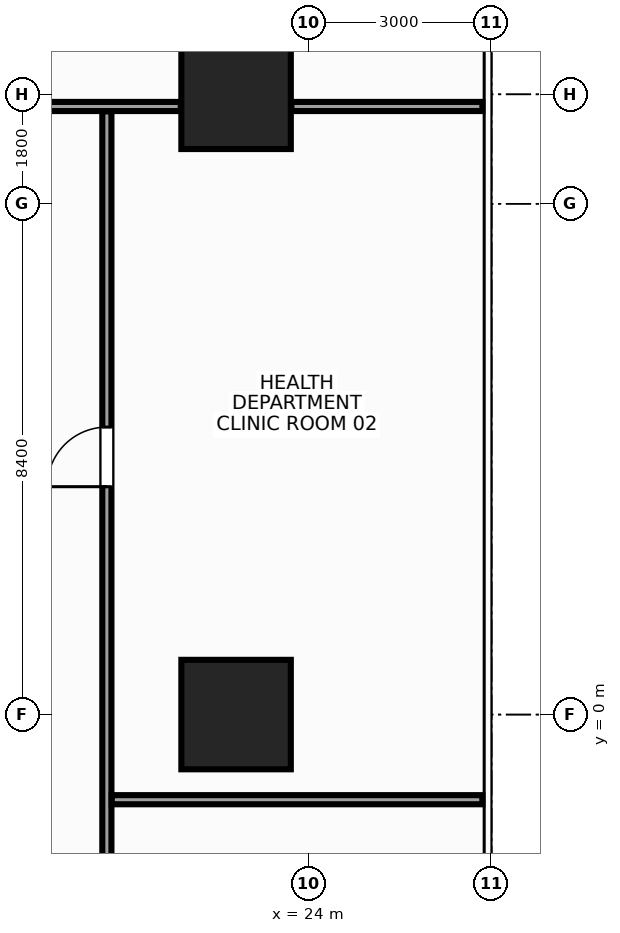
"""IFC4 building model, lengths in metres.
Left out: names, types, materials, properties, quantities, classifications, styles, units other than length and angle.
Written with IfcOpenShell. Run it as: python <this file> out.ifc"""

import sys

from ifc_helpers import new_model, si_unit, direction, frame, frame_2d, origin, origin_2d, place, context, subcontext, project, spatial, rectangle, extrude, source, transform, mapped, element, fill, save


model = new_model("IFC4")
c1 = context("Model", 3, precision=1e-05, world=origin(), true_north=direction((0.0, 1.0)))
c2 = subcontext(c1, "Body", "Model", "MODEL_VIEW")
j1 = project(units=[si_unit("LENGTHUNIT", "METRE"), si_unit("PLANEANGLEUNIT", "RADIAN")], contexts=[c1])
p1 = place(None, origin())
s1 = spatial("IfcSite", under=j1, at=p1, CompositionType="ELEMENT")
p2 = place(p1, origin())
s2 = spatial("IfcBuilding", under=s1, at=p2, CompositionType="ELEMENT")
p3 = place(p2, frame((0.0, 0.0, 48.8)))
s3 = spatial("IfcBuildingStorey", under=s2, at=p3, CompositionType="ELEMENT", Elevation=48.8)
m1 = source(origin(), c2, "Body", "SweptSolid", [
    extrude(rectangle(XDim=1.8, YDim=1.8, at=origin_2d()), origin(), (0.0, 0.0, 1.0), 3.6),
])
for number, where, z_axis, x_axis in (
    (1, (22.8, 0.0, 0.0), (0.0, 0.0, 1.0), (1.0, 0.0, 0.0)),
    (2, (22.8, 10.2, 0.0), (0.0, 0.0, 1.0), (1.0, 0.0, 0.0)),
):
    element("IfcColumn", number, at=place(p3, frame(where, z_axis=z_axis, x_axis=x_axis)), inside=s3, PredefinedType="COLUMN", context=c2, shape_type="MappedRepresentation", body=[
        mapped(m1, transform((0.0, 0.0, 0.0), x_axis=(1.0, 0.0, 0.0), y_axis=(0.0, 1.0, 0.0), z_axis=(0.0, 0.0, 1.0), scale=1.0)),
    ])
m2 = source(origin(), c2, "Body", "SweptSolid", [
    extrude(rectangle(XDim=4.18, YDim=0.15, at=frame_2d((2.09, 0.0))), origin(), (0.0, 0.0, 1.0), 2.745),
])
p4 = place(p3, frame((17.71, 10.0, 0.0), z_axis=(0.0, 0.0, 1.0), x_axis=(1.0, 0.0, 0.0)))
e3 = element("IfcWall", 3, at=p4, inside=s3, PredefinedType="PARTITIONING", context=c2, shape_type="MappedRepresentation", body=[
    mapped(m2, transform((0.0, 0.0, 0.0), x_axis=(1.0, 0.0, 0.0), y_axis=(0.0, 1.0, 0.0), z_axis=(0.0, 0.0, 1.0), scale=1.0)),
])
m3 = source(origin(), c2, "Body", "SweptSolid", [
    extrude(rectangle(XDim=3.14, YDim=0.15, at=frame_2d((1.57, 0.0))), origin(), (0.0, 0.0, 1.0), 2.435),
])
p5 = place(p3, frame((23.71, 10.0, 0.0), z_axis=(0.0, 0.0, 1.0), x_axis=(1.0, 0.0, 0.0)))
e4 = element("IfcWall", 4, at=p5, inside=s3, PredefinedType="PARTITIONING", context=c2, shape_type="MappedRepresentation", body=[
    mapped(m3, transform((0.0, 0.0, 0.0), x_axis=(1.0, 0.0, 0.0), y_axis=(0.0, 1.0, 0.0), z_axis=(0.0, 0.0, 1.0), scale=1.0)),
])
m4 = source(origin(), c2, "Body", "SweptSolid", [
    extrude(rectangle(XDim=24.115, YDim=0.15, at=frame_2d((12.058, 0.0))), origin(), (0.0, 0.0, 1.0), 2.745),
])
p6 = place(p3, frame((20.675, -14.195, 0.0), z_axis=(0.0, 0.0, 1.0), x_axis=(0.0, 1.0, 0.0)))
e5 = element("IfcWall", 5, at=p6, inside=s3, PredefinedType="PARTITIONING", context=c2, shape_type="MappedRepresentation", body=[
    mapped(m4, transform((0.0, 0.0, 0.0), x_axis=(1.0, 0.0, 0.0), y_axis=(0.0, 1.0, 0.0), z_axis=(0.0, 0.0, 1.0), scale=1.0)),
])
p7 = place(p6, frame((17.942, 0.0, 0.0)))
e6 = element("IfcOpeningElement", 6, at=p7, cuts=e5, PredefinedType="OPENING", context=c2, shape_type="SweptSolid", body=[
    extrude(rectangle(XDim=0.98, YDim=2.15, at=frame_2d((0.49, 1.075))), frame((0.0, 0.087, 0.0), z_axis=(0.0, -1.0, 0.0), x_axis=(1.0, 0.0, 0.0)), (0.0, 0.0, 1.0), 0.174),
])
m5 = source(origin(), c2, "Body", "SweptSolid", [
    extrude(rectangle(XDim=6.095, YDim=0.15, at=frame_2d((3.048, 0.0))), origin(), (0.0, 0.0, 1.0), 2.745),
])
p8 = place(p3, frame((20.755, -1.4, 0.0), z_axis=(0.0, 0.0, 1.0), x_axis=(1.0, 0.0, 0.0)))
e7 = element("IfcWall", 7, at=p8, inside=s3, PredefinedType="PARTITIONING", context=c2, shape_type="MappedRepresentation", body=[
    mapped(m5, transform((0.0, 0.0, 0.0), x_axis=(1.0, 0.0, 0.0), y_axis=(0.0, 1.0, 0.0), z_axis=(0.0, 0.0, 1.0), scale=1.0)),
])
m6 = source(origin(), c2, "Body", "SweptSolid", [
    extrude(rectangle(XDim=0.98, YDim=2.15, at=frame_2d((0.49, 1.075))), frame((0.0, 0.025, 0.0), z_axis=(0.0, -1.0, 0.0), x_axis=(1.0, 0.0, 0.0)), (0.0, 0.0, 1.0), 0.05),
])
p9 = place(p7, origin())
e8 = element("IfcDoor", 8, at=p9, inside=s3, OperationType="SINGLE_SWING_LEFT", PredefinedType="DOOR", context=c2, shape_type="MappedRepresentation", body=[
    mapped(m6, transform((0.0, 0.0, 0.0), x_axis=(1.0, 0.0, 0.0), y_axis=(0.0, 1.0, 0.0), z_axis=(0.0, 0.0, 1.0), scale=1.0)),
])
fill(e6, e8)
save(model, sys.argv[1])
